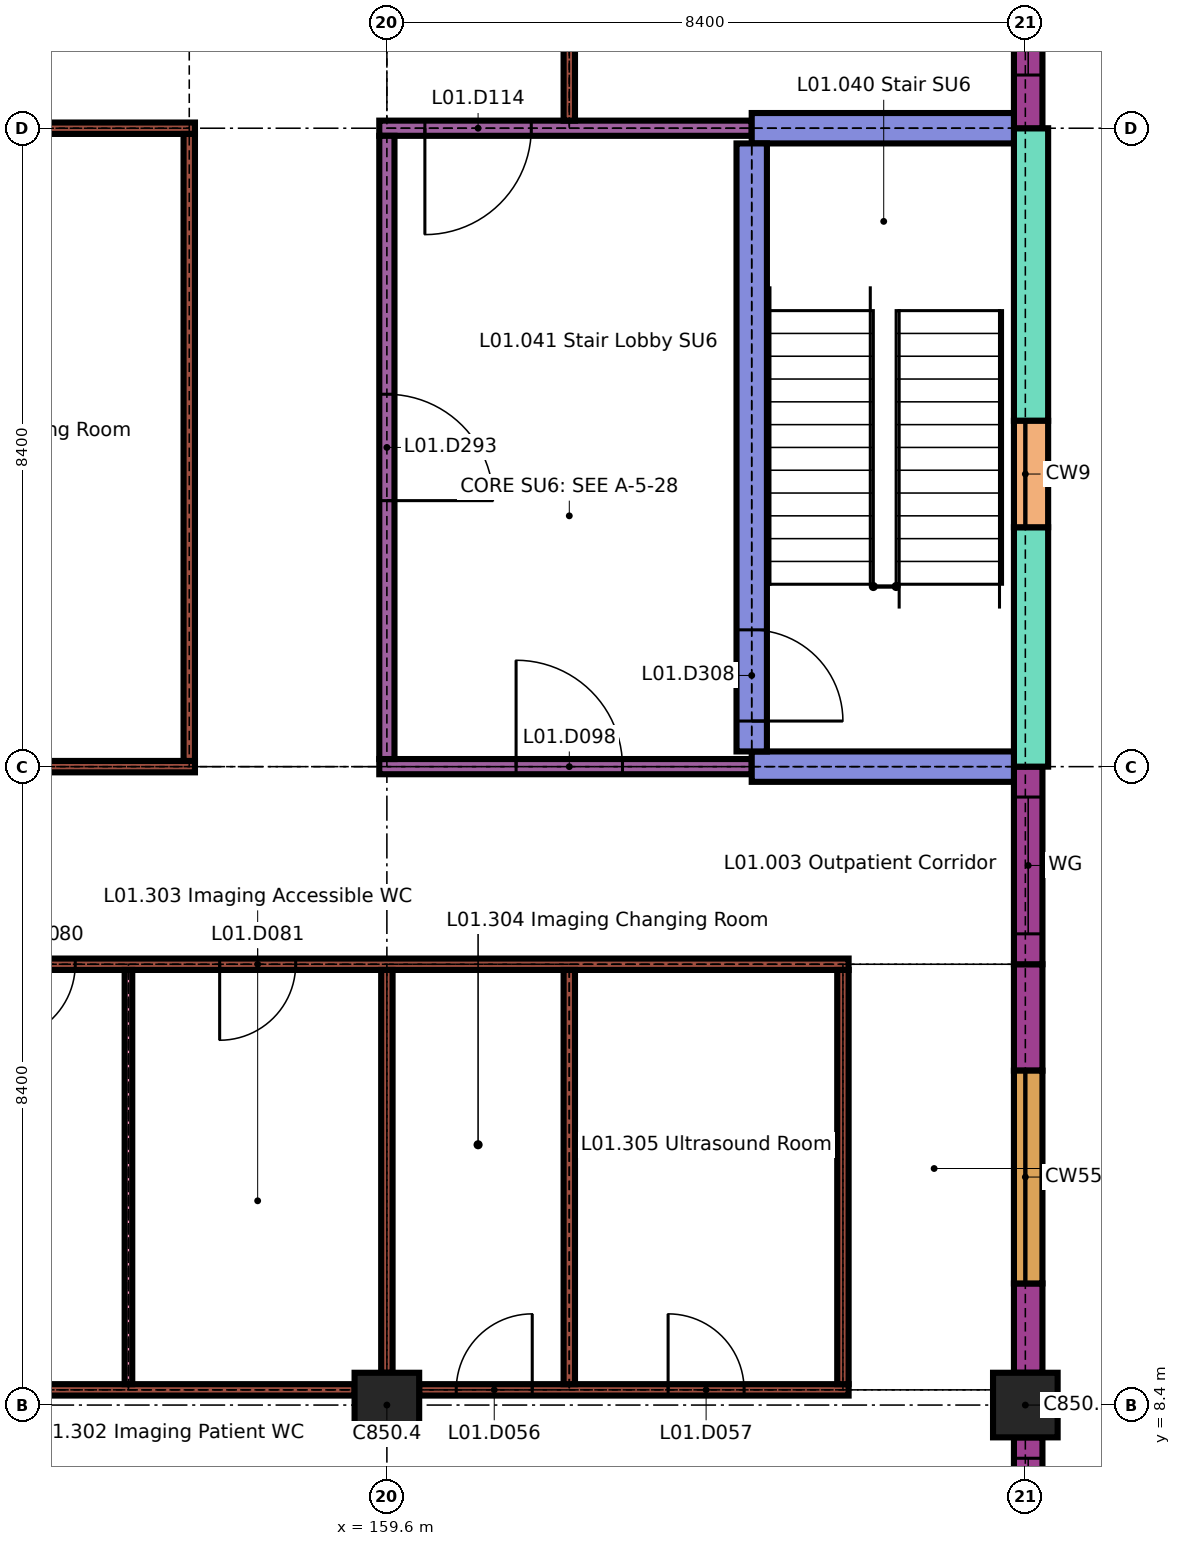
"""IFC4 building model, lengths in metres.
Left out: names, types, materials, properties, quantities, classifications, styles, units other than length and angle.
Written with IfcOpenShell. Run it as: python <this file> out.ifc"""

import sys

from ifc_helpers import new_model, si_unit, direction, frame, frame_2d, origin, origin_2d, place, context, subcontext, project, spatial, rectangle, extrude, element, fill, save


model = new_model("IFC4")
c1 = context("Model", 3, precision=1e-05, world=origin(), true_north=direction((0.0, 1.0)))
c2 = subcontext(c1, "Body", "Model", "MODEL_VIEW")
j1 = project(units=[si_unit("LENGTHUNIT", "METRE"), si_unit("PLANEANGLEUNIT", "RADIAN")], contexts=[c1])
p1 = place(None, origin())
s1 = spatial("IfcSite", under=j1, at=p1, CompositionType="ELEMENT")
p2 = place(p1, origin())
s2 = spatial("IfcBuilding", under=s1, at=p2, CompositionType="ELEMENT")
p3 = place(p2, frame((0.0, 0.0, 4.5)))
s3 = spatial("IfcBuildingStorey", under=s2, at=p3, CompositionType="ELEMENT", Elevation=4.5)
for number, where, z_axis, x_axis in (
    (1, (159.6, 8.4, 0.0), (0.0, 0.0, 1.0), (1.0, 0.0, 0.0)),
    (2, (168.0, 8.4, 0.0), (0.0, 0.0, 1.0), (1.0, 0.0, 0.0)),
):
    element("IfcColumn", number, at=place(p3, frame(where, z_axis=z_axis, x_axis=x_axis)), inside=s3, PredefinedType="COLUMN", context=c2, shape_type="SweptSolid", body=[
        extrude(rectangle(XDim=0.85, YDim=0.85, at=origin_2d()), origin(), (0.0, 0.0, 1.0), 3.45),
    ])
p4 = place(p3, frame((168.038, 6.0, 0.0), z_axis=(0.0, 0.0, 1.0), x_axis=(0.0, 1.0, 0.0)))
e3 = element("IfcWall", 3, at=p4, inside=s3, PredefinedType="SOLIDWALL", context=c2, shape_type="SweptSolid", body=[
    extrude(rectangle(XDim=1.975, YDim=0.375, at=frame_2d((0.988, 0.0))), origin(), (0.0, 0.0, 1.0), 3.15),
])
p5 = place(p4, frame((0.5, 0.0, 0.9)))
e4 = element("IfcOpeningElement", 4, at=p5, cuts=e3, PredefinedType="OPENING", context=c2, shape_type="SweptSolid", body=[
    extrude(rectangle(XDim=1.2, YDim=1.5, at=frame_2d((0.6, 0.75))), frame((0.0, 0.198, 0.0), z_axis=(0.0, -1.0, 0.0), x_axis=(1.0, 0.0, 0.0)), (0.0, 0.0, 1.0), 0.395),
])
p6 = place(p3, frame((168.038, 8.825, 0.0), z_axis=(0.0, 0.0, 1.0), x_axis=(0.0, 1.0, 0.0)))
e5 = element("IfcWall", 5, at=p6, inside=s3, PredefinedType="SOLIDWALL", context=c2, shape_type="SweptSolid", body=[
    extrude(rectangle(XDim=1.175, YDim=0.375, at=frame_2d((0.587, 0.0))), origin(), (0.0, 0.0, 1.0), 3.15),
])
p7 = place(p3, frame((168.038, 12.8, 0.0), z_axis=(0.0, 0.0, 1.0), x_axis=(0.0, 1.0, 0.0)))
e6 = element("IfcWall", 6, at=p7, inside=s3, PredefinedType="SOLIDWALL", context=c2, shape_type="SweptSolid", body=[
    extrude(rectangle(XDim=1.4, YDim=0.375, at=frame_2d((0.7, 0.0))), origin(), (0.0, 0.0, 1.0), 3.15),
])
p8 = place(p3, frame((168.038, 10.0, 0.0), z_axis=(0.0, 0.0, 1.0), x_axis=(0.0, 1.0, 0.0)))
e7 = element("IfcWall", 7, at=p8, inside=s3, PredefinedType="SOLIDWALL", context=c2, shape_type="SweptSolid", body=[
    extrude(rectangle(XDim=2.8, YDim=0.375, at=frame_2d((1.4, 0.0))), origin(), (0.0, 0.0, 1.0), 0.6),
])
p9 = place(p3, frame((168.038, 14.2, 0.0), z_axis=(0.0, 0.0, 1.0), x_axis=(0.0, 1.0, 0.0)))
e8 = element("IfcWall", 8, at=p9, inside=s3, PredefinedType="SOLIDWALL", context=c2, shape_type="SweptSolid", body=[
    extrude(rectangle(XDim=2.6, YDim=0.375, at=frame_2d((1.3, 0.0))), origin(), (0.0, 0.0, 1.0), 3.15),
])
p10 = place(p9, frame((0.4, 0.0, 0.9)))
e9 = element("IfcOpeningElement", 9, at=p10, cuts=e8, PredefinedType="OPENING", context=c2, shape_type="SweptSolid", body=[
    extrude(rectangle(XDim=1.8, YDim=1.5, at=frame_2d((0.9, 0.75))), frame((0.0, 0.198, 0.0), z_axis=(0.0, -1.0, 0.0), x_axis=(1.0, 0.0, 0.0)), (0.0, 0.0, 1.0), 0.395),
])
p11 = place(p3, frame((168.075, 16.8, 0.0), z_axis=(0.0, 0.0, 1.0), x_axis=(0.0, 1.0, 0.0)))
e10 = element("IfcWall", 10, at=p11, inside=s3, PredefinedType="SOLIDWALL", context=c2, shape_type="SweptSolid", body=[
    extrude(rectangle(XDim=3.15, YDim=0.45, at=frame_2d((1.575, 0.0))), origin(), (0.0, 0.0, 1.0), 3.45),
])
p12 = place(p3, frame((168.075, 21.35, 0.0), z_axis=(0.0, 0.0, 1.0), x_axis=(0.0, 1.0, 0.0)))
e11 = element("IfcWall", 11, at=p12, inside=s3, PredefinedType="SOLIDWALL", context=c2, shape_type="SweptSolid", body=[
    extrude(rectangle(XDim=3.85, YDim=0.45, at=frame_2d((1.925, 0.0))), origin(), (0.0, 0.0, 1.0), 3.45),
])
p13 = place(p3, frame((168.075, 19.95, 0.0), z_axis=(0.0, 0.0, 1.0), x_axis=(0.0, 1.0, 0.0)))
e12 = element("IfcWall", 12, at=p13, inside=s3, PredefinedType="SOLIDWALL", context=c2, shape_type="SweptSolid", body=[
    extrude(rectangle(XDim=1.4, YDim=0.45, at=frame_2d((0.7, 0.0))), origin(), (0.0, 0.0, 1.0), 0.6),
])
p14 = place(p3, frame((168.038, 25.2, 0.0), z_axis=(0.0, 0.0, 1.0), x_axis=(0.0, 1.0, 0.0)))
e13 = element("IfcWall", 13, at=p14, inside=s3, PredefinedType="SOLIDWALL", context=c2, shape_type="SweptSolid", body=[
    extrude(rectangle(XDim=7.975, YDim=0.375, at=frame_2d((3.988, 0.0))), origin(), (0.0, 0.0, 1.0), 3.15),
])
p15 = place(p14, frame((0.7, 0.0, 1.0)))
e14 = element("IfcOpeningElement", 14, at=p15, cuts=e13, PredefinedType="OPENING", context=c2, shape_type="SweptSolid", body=[
    extrude(rectangle(XDim=2.8, YDim=1.2, at=frame_2d((1.4, 0.6))), frame((0.0, 0.198, 0.0), z_axis=(0.0, -1.0, 0.0), x_axis=(1.0, 0.0, 0.0)), (0.0, 0.0, 1.0), 0.395),
])
p16 = place(p14, frame((4.9, 0.0, 1.0)))
e15 = element("IfcOpeningElement", 15, at=p16, cuts=e13, PredefinedType="OPENING", context=c2, shape_type="SweptSolid", body=[
    extrude(rectangle(XDim=2.8, YDim=1.2, at=frame_2d((1.4, 0.6))), frame((0.0, 0.198, 0.0), z_axis=(0.0, -1.0, 0.0), x_axis=(1.0, 0.0, 0.0)), (0.0, 0.0, 1.0), 0.395),
])
p17 = place(p3, frame((153.8, 8.6, 0.0), z_axis=(0.0, 0.0, 1.0), x_axis=(1.0, 0.0, 0.0)))
e16 = element("IfcWall", 16, at=p17, inside=s3, PredefinedType="PARTITIONING", context=c2, shape_type="SweptSolid", body=[
    extrude(rectangle(XDim=5.375, YDim=0.15, at=frame_2d((2.688, 0.0))), origin(), (0.0, 0.0, 1.0), 3.45),
])
p18 = place(p3, frame((160.025, 8.6, 0.0), z_axis=(0.0, 0.0, 1.0), x_axis=(1.0, 0.0, 0.0)))
e17 = element("IfcWall", 17, at=p18, inside=s3, PredefinedType="PARTITIONING", context=c2, shape_type="SweptSolid", body=[
    extrude(rectangle(XDim=5.65, YDim=0.15, at=frame_2d((2.825, 0.0))), origin(), (0.0, 0.0, 1.0), 3.45),
])
p19 = place(p18, frame((0.488, 0.0, 0.0)))
e18 = element("IfcOpeningElement", 18, at=p19, cuts=e17, PredefinedType="OPENING", context=c2, shape_type="SweptSolid", body=[
    extrude(rectangle(XDim=1.0, YDim=2.1, at=frame_2d((0.5, 1.05))), frame((0.0, 0.085, 0.0), z_axis=(0.0, -1.0, 0.0), x_axis=(1.0, 0.0, 0.0)), (0.0, 0.0, 1.0), 0.17),
])
p20 = place(p18, frame((3.275, 0.0, 0.0)))
e19 = element("IfcOpeningElement", 19, at=p20, cuts=e17, PredefinedType="OPENING", context=c2, shape_type="SweptSolid", body=[
    extrude(rectangle(XDim=1.0, YDim=2.1, at=frame_2d((0.5, 1.05))), frame((0.0, 0.085, 0.0), z_axis=(0.0, -1.0, 0.0), x_axis=(1.0, 0.0, 0.0)), (0.0, 0.0, 1.0), 0.17),
])
p21 = place(p3, frame((153.8, 14.2, 0.0), z_axis=(0.0, 0.0, 1.0), x_axis=(1.0, 0.0, 0.0)))
e20 = element("IfcWall", 20, at=p21, inside=s3, PredefinedType="PARTITIONING", context=c2, shape_type="SweptSolid", body=[
    extrude(rectangle(XDim=11.875, YDim=0.15, at=frame_2d((5.938, 0.0))), origin(), (0.0, 0.0, 1.0), 3.45),
])
p22 = place(p21, frame((0.7, 0.0, 0.0)))
e21 = element("IfcOpeningElement", 21, at=p22, cuts=e20, PredefinedType="OPENING", context=c2, shape_type="SweptSolid", body=[
    extrude(rectangle(XDim=1.0, YDim=2.1, at=frame_2d((0.5, 1.05))), frame((0.0, 0.085, 0.0), z_axis=(0.0, -1.0, 0.0), x_axis=(1.0, 0.0, 0.0)), (0.0, 0.0, 1.0), 0.17),
])
p23 = place(p21, frame((3.6, 0.0, 0.0)))
e22 = element("IfcOpeningElement", 22, at=p23, cuts=e20, PredefinedType="OPENING", context=c2, shape_type="SweptSolid", body=[
    extrude(rectangle(XDim=1.0, YDim=2.1, at=frame_2d((0.5, 1.05))), frame((0.0, 0.085, 0.0), z_axis=(0.0, -1.0, 0.0), x_axis=(1.0, 0.0, 0.0)), (0.0, 0.0, 1.0), 0.17),
])
p24 = place(p3, frame((151.625, 16.8, 0.0), z_axis=(0.0, 0.0, 1.0), x_axis=(1.0, 0.0, 0.0)))
e23 = element("IfcWall", 23, at=p24, inside=s3, PredefinedType="PARTITIONING", context=c2, shape_type="SweptSolid", body=[
    extrude(rectangle(XDim=5.45, YDim=0.15, at=frame_2d((2.725, 0.0))), origin(), (0.0, 0.0, 1.0), 3.45),
])
p25 = place(p24, frame((2.188, 0.0, 0.0)))
e24 = element("IfcOpeningElement", 24, at=p25, cuts=e23, PredefinedType="OPENING", context=c2, shape_type="SweptSolid", body=[
    extrude(rectangle(XDim=1.0, YDim=2.1, at=frame_2d((0.5, 1.05))), frame((0.0, 0.085, 0.0), z_axis=(0.0, -1.0, 0.0), x_axis=(1.0, 0.0, 0.0)), (0.0, 0.0, 1.0), 0.17),
])
p26 = place(p3, frame((159.5, 16.8, 0.0), z_axis=(0.0, 0.0, 1.0), x_axis=(1.0, 0.0, 0.0)))
e25 = element("IfcWall", 25, at=p26, inside=s3, PredefinedType="PARTITIONING", context=c2, shape_type="SweptSolid", body=[
    extrude(rectangle(XDim=4.9, YDim=0.2, at=frame_2d((2.45, 0.0))), origin(), (0.0, 0.0, 1.0), 3.45),
])
p27 = place(p26, frame((1.8, 0.0, 0.0)))
e26 = element("IfcOpeningElement", 26, at=p27, cuts=e25, PredefinedType="OPENING", context=c2, shape_type="SweptSolid", body=[
    extrude(rectangle(XDim=1.4, YDim=2.1, at=frame_2d((0.7, 1.05))), frame((0.0, 0.11, 0.0), z_axis=(0.0, -1.0, 0.0), x_axis=(1.0, 0.0, 0.0)), (0.0, 0.0, 1.0), 0.22),
])
p28 = place(p3, frame((164.4, 16.8, 0.0), z_axis=(0.0, 0.0, 1.0), x_axis=(1.0, 0.0, 0.0)))
e27 = element("IfcWall", 27, at=p28, inside=s3, PredefinedType="SHEAR", context=c2, shape_type="SweptSolid", body=[
    extrude(rectangle(XDim=3.45, YDim=0.4, at=frame_2d((1.725, 0.0))), origin(), (0.0, 0.0, 1.0), 3.45),
])
p29 = place(p3, frame((151.625, 25.2, 0.0), z_axis=(0.0, 0.0, 1.0), x_axis=(1.0, 0.0, 0.0)))
e28 = element("IfcWall", 28, at=p29, inside=s3, PredefinedType="PARTITIONING", context=c2, shape_type="SweptSolid", body=[
    extrude(rectangle(XDim=5.45, YDim=0.15, at=frame_2d((2.725, 0.0))), origin(), (0.0, 0.0, 1.0), 3.45),
])
p30 = place(p3, frame((159.5, 25.2, 0.0), z_axis=(0.0, 0.0, 1.0), x_axis=(1.0, 0.0, 0.0)))
e29 = element("IfcWall", 29, at=p30, inside=s3, PredefinedType="PARTITIONING", context=c2, shape_type="SweptSolid", body=[
    extrude(rectangle(XDim=4.9, YDim=0.2, at=frame_2d((2.45, 0.0))), origin(), (0.0, 0.0, 1.0), 3.45),
])
p31 = place(p30, frame((0.6, 0.0, 0.0)))
e30 = element("IfcOpeningElement", 30, at=p31, cuts=e29, PredefinedType="OPENING", context=c2, shape_type="SweptSolid", body=[
    extrude(rectangle(XDim=1.4, YDim=2.1, at=frame_2d((0.7, 1.05))), frame((0.0, 0.11, 0.0), z_axis=(0.0, -1.0, 0.0), x_axis=(1.0, 0.0, 0.0)), (0.0, 0.0, 1.0), 0.22),
])
p32 = place(p3, frame((164.4, 25.2, 0.0), z_axis=(0.0, 0.0, 1.0), x_axis=(1.0, 0.0, 0.0)))
e31 = element("IfcWall", 31, at=p32, inside=s3, PredefinedType="SHEAR", context=c2, shape_type="SweptSolid", body=[
    extrude(rectangle(XDim=3.45, YDim=0.4, at=frame_2d((1.725, 0.0))), origin(), (0.0, 0.0, 1.0), 3.45),
])
p33 = place(p3, frame((156.2, 8.675, 0.0), z_axis=(0.0, 0.0, 1.0), x_axis=(0.0, 1.0, 0.0)))
e32 = element("IfcWall", 32, at=p33, inside=s3, PredefinedType="PARTITIONING", context=c2, shape_type="SweptSolid", body=[
    extrude(rectangle(XDim=5.45, YDim=0.1, at=frame_2d((2.725, 0.0))), origin(), (0.0, 0.0, 1.0), 3.45),
])
p34 = place(p3, frame((157.0, 16.875, 0.0), z_axis=(0.0, 0.0, 1.0), x_axis=(0.0, 1.0, 0.0)))
e33 = element("IfcWall", 33, at=p34, inside=s3, PredefinedType="PARTITIONING", context=c2, shape_type="SweptSolid", body=[
    extrude(rectangle(XDim=8.25, YDim=0.15, at=frame_2d((4.125, 0.0))), origin(), (0.0, 0.0, 1.0), 3.45),
])
p35 = place(p3, frame((159.6, 8.825, 0.0), z_axis=(0.0, 0.0, 1.0), x_axis=(0.0, 1.0, 0.0)))
e34 = element("IfcWall", 34, at=p35, inside=s3, PredefinedType="PARTITIONING", context=c2, shape_type="SweptSolid", body=[
    extrude(rectangle(XDim=5.3, YDim=0.15, at=frame_2d((2.65, 0.0))), origin(), (0.0, 0.0, 1.0), 3.45),
])
p36 = place(p3, frame((159.6, 16.9, 0.0), z_axis=(0.0, 0.0, 1.0), x_axis=(0.0, 1.0, 0.0)))
e35 = element("IfcWall", 35, at=p36, inside=s3, PredefinedType="PARTITIONING", context=c2, shape_type="SweptSolid", body=[
    extrude(rectangle(XDim=8.2, YDim=0.2, at=frame_2d((4.1, 0.0))), origin(), (0.0, 0.0, 1.0), 3.45),
])
p37 = place(p36, frame((3.4, 0.0, 0.0)))
e36 = element("IfcOpeningElement", 36, at=p37, cuts=e35, PredefinedType="OPENING", context=c2, shape_type="SweptSolid", body=[
    extrude(rectangle(XDim=1.4, YDim=2.1, at=frame_2d((0.7, 1.05))), frame((0.0, 0.11, 0.0), z_axis=(0.0, -1.0, 0.0), x_axis=(1.0, 0.0, 0.0)), (0.0, 0.0, 1.0), 0.22),
])
p38 = place(p3, frame((162.0, 8.675, 0.0), z_axis=(0.0, 0.0, 1.0), x_axis=(0.0, 1.0, 0.0)))
e37 = element("IfcWall", 37, at=p38, inside=s3, PredefinedType="PARTITIONING", context=c2, shape_type="SweptSolid", body=[
    extrude(rectangle(XDim=5.45, YDim=0.15, at=frame_2d((2.725, 0.0))), origin(), (0.0, 0.0, 1.0), 3.45),
])
p39 = place(p3, frame((162.0, 25.3, 0.0), z_axis=(0.0, 0.0, 1.0), x_axis=(0.0, 1.0, 0.0)))
e38 = element("IfcWall", 38, at=p39, inside=s3, PredefinedType="PARTITIONING", context=c2, shape_type="SweptSolid", body=[
    extrude(rectangle(XDim=8.225, YDim=0.15, at=frame_2d((4.112, 0.0))), origin(), (0.0, 0.0, 1.0), 3.45),
])
p40 = place(p39, frame((3.613, 0.0, 0.0)))
e39 = element("IfcOpeningElement", 39, at=p40, cuts=e38, PredefinedType="OPENING", context=c2, shape_type="SweptSolid", body=[
    extrude(rectangle(XDim=1.0, YDim=2.1, at=frame_2d((0.5, 1.05))), frame((0.0, 0.085, 0.0), z_axis=(0.0, -1.0, 0.0), x_axis=(1.0, 0.0, 0.0)), (0.0, 0.0, 1.0), 0.17),
])
p41 = place(p3, frame((164.4, 17.0, 0.0), z_axis=(0.0, 0.0, 1.0), x_axis=(0.0, 1.0, 0.0)))
e40 = element("IfcWall", 40, at=p41, inside=s3, PredefinedType="SHEAR", context=c2, shape_type="SweptSolid", body=[
    extrude(rectangle(XDim=8.0, YDim=0.4, at=frame_2d((4.0, 0.0))), origin(), (0.0, 0.0, 1.0), 3.45),
])
p42 = place(p41, frame((0.4, 0.0, 0.0)))
e41 = element("IfcOpeningElement", 41, at=p42, cuts=e40, PredefinedType="OPENING", context=c2, shape_type="SweptSolid", body=[
    extrude(rectangle(XDim=1.2, YDim=2.1, at=frame_2d((0.6, 1.05))), frame((0.0, 0.21, 0.0), z_axis=(0.0, -1.0, 0.0), x_axis=(1.0, 0.0, 0.0)), (0.0, 0.0, 1.0), 0.42),
])
p43 = place(p3, frame((165.6, 8.675, 0.0), z_axis=(0.0, 0.0, 1.0), x_axis=(0.0, 1.0, 0.0)))
e42 = element("IfcWall", 42, at=p43, inside=s3, PredefinedType="PARTITIONING", context=c2, shape_type="SweptSolid", body=[
    extrude(rectangle(XDim=5.45, YDim=0.15, at=frame_2d((2.725, 0.0))), origin(), (0.0, 0.0, 1.0), 3.45),
])
p44 = place(p5, origin())
e43 = element("IfcWindow", 43, at=p44, inside=s3, PartitioningType="SINGLE_PANEL", PredefinedType="WINDOW", context=c2, shape_type="SweptSolid", body=[
    extrude(rectangle(XDim=1.2, YDim=1.5, at=frame_2d((0.6, 0.75))), frame((0.0, 0.03, 0.0), z_axis=(0.0, -1.0, 0.0), x_axis=(1.0, 0.0, 0.0)), (0.0, 0.0, 1.0), 0.06),
])
fill(e4, e43)
p45 = place(p10, origin())
e44 = element("IfcWindow", 44, at=p45, inside=s3, PartitioningType="DOUBLE_PANEL_VERTICAL", PredefinedType="WINDOW", context=c2, shape_type="SweptSolid", body=[
    extrude(rectangle(XDim=1.8, YDim=1.5, at=frame_2d((0.9, 0.75))), frame((0.0, 0.03, 0.0), z_axis=(0.0, -1.0, 0.0), x_axis=(1.0, 0.0, 0.0)), (0.0, 0.0, 1.0), 0.06),
])
fill(e9, e44)
p46 = place(p15, origin())
e45 = element("IfcWindow", 45, at=p46, inside=s3, PartitioningType="DOUBLE_PANEL_VERTICAL", PredefinedType="WINDOW", context=c2, shape_type="SweptSolid", body=[
    extrude(rectangle(XDim=2.8, YDim=1.2, at=frame_2d((1.4, 0.6))), frame((0.0, 0.03, 0.0), z_axis=(0.0, -1.0, 0.0), x_axis=(1.0, 0.0, 0.0)), (0.0, 0.0, 1.0), 0.06),
])
fill(e14, e45)
p47 = place(p19, origin())
e46 = element("IfcDoor", 46, at=p47, inside=s3, OperationType="SINGLE_SWING_LEFT", PredefinedType="DOOR", context=c2, shape_type="SweptSolid", body=[
    extrude(rectangle(XDim=1.0, YDim=2.1, at=frame_2d((0.5, 1.05))), frame((0.0, 0.025, 0.0), z_axis=(0.0, -1.0, 0.0), x_axis=(1.0, 0.0, 0.0)), (0.0, 0.0, 1.0), 0.05),
])
fill(e18, e46)
p48 = place(p20, origin())
e47 = element("IfcDoor", 47, at=p48, inside=s3, OperationType="SINGLE_SWING_RIGHT", PredefinedType="DOOR", context=c2, shape_type="SweptSolid", body=[
    extrude(rectangle(XDim=1.0, YDim=2.1, at=frame_2d((0.5, 1.05))), frame((0.0, 0.025, 0.0), z_axis=(0.0, -1.0, 0.0), x_axis=(1.0, 0.0, 0.0)), (0.0, 0.0, 1.0), 0.05),
])
fill(e19, e47)
p49 = place(p22, origin())
e48 = element("IfcDoor", 48, at=p49, inside=s3, OperationType="SINGLE_SWING_LEFT", PredefinedType="DOOR", context=c2, shape_type="SweptSolid", body=[
    extrude(rectangle(XDim=1.0, YDim=2.1, at=frame_2d((0.5, 1.05))), frame((0.0, 0.025, 0.0), z_axis=(0.0, -1.0, 0.0), x_axis=(1.0, 0.0, 0.0)), (0.0, 0.0, 1.0), 0.05),
])
fill(e21, e48)
p50 = place(p23, origin())
e49 = element("IfcDoor", 49, at=p50, inside=s3, OperationType="SINGLE_SWING_LEFT", PredefinedType="DOOR", context=c2, shape_type="SweptSolid", body=[
    extrude(rectangle(XDim=1.0, YDim=2.1, at=frame_2d((0.5, 1.05))), frame((0.0, 0.025, 0.0), z_axis=(0.0, -1.0, 0.0), x_axis=(1.0, 0.0, 0.0)), (0.0, 0.0, 1.0), 0.05),
])
fill(e22, e49)
p51 = place(p27, origin())
e50 = element("IfcDoor", 50, at=p51, inside=s3, OperationType="SINGLE_SWING_RIGHT", PredefinedType="DOOR", context=c2, shape_type="SweptSolid", body=[
    extrude(rectangle(XDim=1.4, YDim=2.1, at=frame_2d((0.7, 1.05))), frame((0.0, 0.03, 0.0), z_axis=(0.0, -1.0, 0.0), x_axis=(1.0, 0.0, 0.0)), (0.0, 0.0, 1.0), 0.06),
])
fill(e26, e50)
p52 = place(p31, origin())
e51 = element("IfcDoor", 51, at=p52, inside=s3, OperationType="SINGLE_SWING_LEFT", PredefinedType="DOOR", context=c2, shape_type="SweptSolid", body=[
    extrude(rectangle(XDim=1.4, YDim=2.1, at=frame_2d((0.7, 1.05))), frame((0.0, 0.03, 0.0), z_axis=(0.0, -1.0, 0.0), x_axis=(1.0, 0.0, 0.0)), (0.0, 0.0, 1.0), 0.06),
])
fill(e30, e51)
p53 = place(p37, origin())
e52 = element("IfcDoor", 52, at=p53, inside=s3, OperationType="SINGLE_SWING_LEFT", PredefinedType="DOOR", context=c2, shape_type="SweptSolid", body=[
    extrude(rectangle(XDim=1.4, YDim=2.1, at=frame_2d((0.7, 1.05))), frame((0.0, 0.03, 0.0), z_axis=(0.0, -1.0, 0.0), x_axis=(1.0, 0.0, 0.0)), (0.0, 0.0, 1.0), 0.06),
])
fill(e36, e52)
p54 = place(p42, origin())
e53 = element("IfcDoor", 53, at=p54, inside=s3, OperationType="SINGLE_SWING_LEFT", PredefinedType="DOOR", context=c2, shape_type="SweptSolid", body=[
    extrude(rectangle(XDim=1.2, YDim=2.1, at=frame_2d((0.6, 1.05))), frame((0.0, 0.025, 0.0), z_axis=(0.0, -1.0, 0.0), x_axis=(1.0, 0.0, 0.0)), (0.0, 0.0, 1.0), 0.05),
])
fill(e41, e53)
save(model, sys.argv[1])
